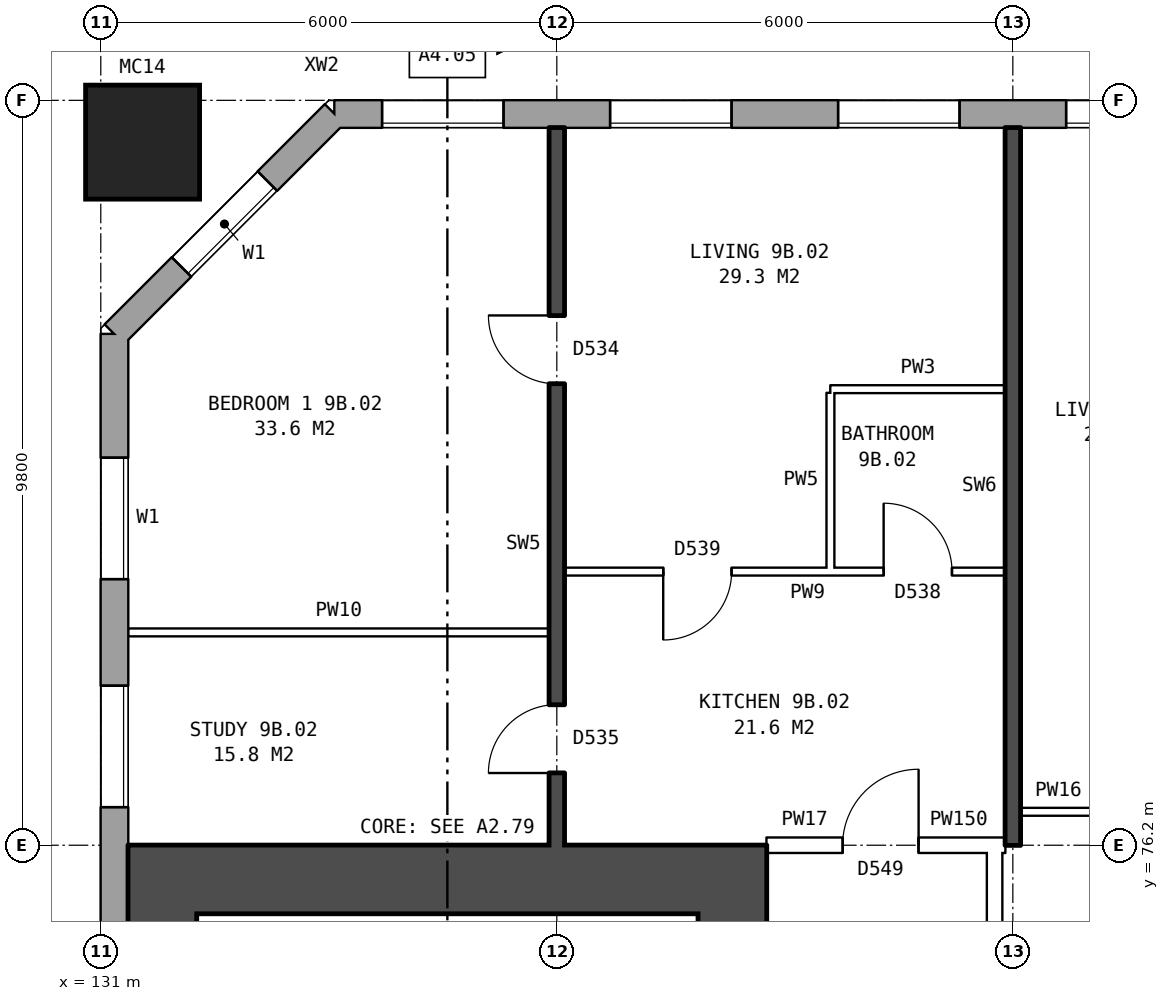
"""IFC4 building model, lengths in metres.
Left out: names, types, materials, properties, quantities, classifications, styles, units other than length and angle.
Written with IfcOpenShell. Run it as: python <this file> out.ifc"""

import sys

from ifc_helpers import new_model, si_unit, direction, frame, frame_2d, origin, origin_2d, place, context, subcontext, project, spatial, rectangle, hollow_rectangle, extrude, element, fill, save


model = new_model("IFC4")
c1 = context("Model", 3, precision=1e-05, world=origin(), true_north=direction((0.0, 1.0)))
c2 = subcontext(c1, "Body", "Model", "MODEL_VIEW")
j1 = project(units=[si_unit("LENGTHUNIT", "METRE"), si_unit("PLANEANGLEUNIT", "RADIAN")], contexts=[c1])
p1 = place(None, origin())
s1 = spatial("IfcSite", under=j1, at=p1, CompositionType="ELEMENT")
p2 = place(p1, origin())
s2 = spatial("IfcBuilding", under=s1, at=p2, CompositionType="ELEMENT")
p3 = place(p2, frame((0.0, 0.0, 35.0)))
s3 = spatial("IfcBuildingStorey", under=s2, at=p3, CompositionType="ELEMENT", Elevation=35.0)
p4 = place(p3, frame((131.55, 85.45, 0.0), z_axis=(0.0, 0.0, 1.0), x_axis=(1.0, 0.0, 0.0)))
e1 = element("IfcColumn", 1, at=p4, inside=s3, PredefinedType="COLUMN", context=c2, shape_type="SweptSolid", body=[
    extrude(hollow_rectangle(XDim=1.5, YDim=1.5, WallThickness=0.08, at=origin_2d()), origin(), (0.0, 0.0, 1.0), 3.1),
])
p5 = place(p3, frame((174.675, 85.82, 0.0), z_axis=(0.0, 0.0, 1.0), x_axis=(-1.0, 0.0, 0.0)))
e2 = element("IfcWall", 2, at=p5, inside=s3, PredefinedType="STANDARD", context=c2, shape_type="SweptSolid", body=[
    extrude(rectangle(XDim=40.601, YDim=0.36, at=frame_2d((20.3, 0.0))), origin(), (0.0, 0.0, 1.0), 2.85),
])
p6 = place(p5, frame((2.375, 0.0, 0.8)))
e3 = element("IfcOpeningElement", 3, at=p6, cuts=e2, PredefinedType="OPENING", context=c2, shape_type="SweptSolid", body=[
    extrude(rectangle(XDim=1.6, YDim=1.8, at=frame_2d((0.8, 0.9))), frame((0.0, 0.19, 0.0), z_axis=(0.0, -1.0, 0.0), x_axis=(1.0, 0.0, 0.0)), (0.0, 0.0, 1.0), 0.38),
])
p7 = place(p5, frame((5.375, 0.0, 0.8)))
e4 = element("IfcOpeningElement", 4, at=p7, cuts=e2, PredefinedType="OPENING", context=c2, shape_type="SweptSolid", body=[
    extrude(rectangle(XDim=1.6, YDim=1.8, at=frame_2d((0.8, 0.9))), frame((0.0, 0.19, 0.0), z_axis=(0.0, -1.0, 0.0), x_axis=(1.0, 0.0, 0.0)), (0.0, 0.0, 1.0), 0.38),
])
p8 = place(p5, frame((8.375, 0.0, 0.8)))
e5 = element("IfcOpeningElement", 5, at=p8, cuts=e2, PredefinedType="OPENING", context=c2, shape_type="SweptSolid", body=[
    extrude(rectangle(XDim=1.6, YDim=1.8, at=frame_2d((0.8, 0.9))), frame((0.0, 0.19, 0.0), z_axis=(0.0, -1.0, 0.0), x_axis=(1.0, 0.0, 0.0)), (0.0, 0.0, 1.0), 0.38),
])
p9 = place(p5, frame((11.375, 0.0, 0.8)))
e6 = element("IfcOpeningElement", 6, at=p9, cuts=e2, PredefinedType="OPENING", context=c2, shape_type="SweptSolid", body=[
    extrude(rectangle(XDim=1.6, YDim=1.8, at=frame_2d((0.8, 0.9))), frame((0.0, 0.19, 0.0), z_axis=(0.0, -1.0, 0.0), x_axis=(1.0, 0.0, 0.0)), (0.0, 0.0, 1.0), 0.38),
])
p10 = place(p5, frame((14.375, 0.0, 0.8)))
e7 = element("IfcOpeningElement", 7, at=p10, cuts=e2, PredefinedType="OPENING", context=c2, shape_type="SweptSolid", body=[
    extrude(rectangle(XDim=1.6, YDim=1.8, at=frame_2d((0.8, 0.9))), frame((0.0, 0.19, 0.0), z_axis=(0.0, -1.0, 0.0), x_axis=(1.0, 0.0, 0.0)), (0.0, 0.0, 1.0), 0.38),
])
p11 = place(p5, frame((16.275, 0.0, 0.8)))
e8 = element("IfcOpeningElement", 8, at=p11, cuts=e2, PredefinedType="OPENING", context=c2, shape_type="SweptSolid", body=[
    extrude(rectangle(XDim=1.0, YDim=1.8, at=frame_2d((0.5, 0.9))), frame((0.0, 0.19, 0.0), z_axis=(0.0, -1.0, 0.0), x_axis=(1.0, 0.0, 0.0)), (0.0, 0.0, 1.0), 0.38),
])
p12 = place(p5, frame((19.975, 0.0, 0.15)))
e9 = element("IfcOpeningElement", 9, at=p12, cuts=e2, PredefinedType="OPENING", context=c2, shape_type="SweptSolid", body=[
    extrude(rectangle(XDim=0.6, YDim=1.8, at=frame_2d((0.3, 0.9))), frame((0.0, 0.19, 0.0), z_axis=(0.0, -1.0, 0.0), x_axis=(1.0, 0.0, 0.0)), (0.0, 0.0, 1.0), 0.38),
])
p13 = place(p5, frame((23.375, 0.0, 0.8)))
e10 = element("IfcOpeningElement", 10, at=p13, cuts=e2, PredefinedType="OPENING", context=c2, shape_type="SweptSolid", body=[
    extrude(rectangle(XDim=1.6, YDim=1.8, at=frame_2d((0.8, 0.9))), frame((0.0, 0.19, 0.0), z_axis=(0.0, -1.0, 0.0), x_axis=(1.0, 0.0, 0.0)), (0.0, 0.0, 1.0), 0.38),
])
p14 = place(p5, frame((26.375, 0.0, 0.8)))
e11 = element("IfcOpeningElement", 11, at=p14, cuts=e2, PredefinedType="OPENING", context=c2, shape_type="SweptSolid", body=[
    extrude(rectangle(XDim=1.6, YDim=1.8, at=frame_2d((0.8, 0.9))), frame((0.0, 0.19, 0.0), z_axis=(0.0, -1.0, 0.0), x_axis=(1.0, 0.0, 0.0)), (0.0, 0.0, 1.0), 0.38),
])
p15 = place(p5, frame((29.375, 0.0, 0.8)))
e12 = element("IfcOpeningElement", 12, at=p15, cuts=e2, PredefinedType="OPENING", context=c2, shape_type="SweptSolid", body=[
    extrude(rectangle(XDim=1.6, YDim=1.8, at=frame_2d((0.8, 0.9))), frame((0.0, 0.19, 0.0), z_axis=(0.0, -1.0, 0.0), x_axis=(1.0, 0.0, 0.0)), (0.0, 0.0, 1.0), 0.38),
])
p16 = place(p5, frame((32.375, 0.0, 0.8)))
e13 = element("IfcOpeningElement", 13, at=p16, cuts=e2, PredefinedType="OPENING", context=c2, shape_type="SweptSolid", body=[
    extrude(rectangle(XDim=1.6, YDim=1.8, at=frame_2d((0.8, 0.9))), frame((0.0, 0.19, 0.0), z_axis=(0.0, -1.0, 0.0), x_axis=(1.0, 0.0, 0.0)), (0.0, 0.0, 1.0), 0.38),
])
p17 = place(p5, frame((35.375, 0.0, 0.8)))
e14 = element("IfcOpeningElement", 14, at=p17, cuts=e2, PredefinedType="OPENING", context=c2, shape_type="SweptSolid", body=[
    extrude(rectangle(XDim=1.6, YDim=1.8, at=frame_2d((0.8, 0.9))), frame((0.0, 0.19, 0.0), z_axis=(0.0, -1.0, 0.0), x_axis=(1.0, 0.0, 0.0)), (0.0, 0.0, 1.0), 0.38),
])
p18 = place(p5, frame((38.375, 0.0, 0.8)))
e15 = element("IfcOpeningElement", 15, at=p18, cuts=e2, PredefinedType="OPENING", context=c2, shape_type="SweptSolid", body=[
    extrude(rectangle(XDim=1.6, YDim=1.8, at=frame_2d((0.8, 0.9))), frame((0.0, 0.19, 0.0), z_axis=(0.0, -1.0, 0.0), x_axis=(1.0, 0.0, 0.0)), (0.0, 0.0, 1.0), 0.38),
])
p19 = place(p5, frame((17.575, 0.0, 1.7)))
e16 = element("IfcOpeningElement", 16, at=p19, cuts=e2, PredefinedType="OPENING", context=c2, shape_type="SweptSolid", body=[
    extrude(rectangle(XDim=0.8, YDim=0.9, at=frame_2d((0.4, 0.45))), frame((0.0, 0.19, 0.0), z_axis=(0.0, -1.0, 0.0), x_axis=(1.0, 0.0, 0.0)), (0.0, 0.0, 1.0), 0.38),
])
p20 = place(p5, frame((20.875, 0.0, 0.15)))
e17 = element("IfcOpeningElement", 17, at=p20, cuts=e2, PredefinedType="OPENING", context=c2, shape_type="SweptSolid", body=[
    extrude(rectangle(XDim=0.8, YDim=0.9, at=frame_2d((0.4, 0.45))), frame((0.0, 0.19, 0.0), z_axis=(0.0, -1.0, 0.0), x_axis=(1.0, 0.0, 0.0)), (0.0, 0.0, 1.0), 0.38),
])
p21 = place(p3, frame((134.075, 85.82, 0.0), z_axis=(0.0, 0.0, 1.0), x_axis=(-0.707106781187, -0.707106781187, 0.0)))
e18 = element("IfcWall", 18, at=p21, inside=s3, PredefinedType="STANDARD", context=c2, shape_type="SweptSolid", body=[
    extrude(rectangle(XDim=4.094, YDim=0.36, at=frame_2d((2.047, 0.0))), origin(), (0.0, 0.0, 1.0), 2.85),
])
p22 = place(p21, frame((1.247, 0.0, 0.8)))
e19 = element("IfcOpeningElement", 19, at=p22, cuts=e18, PredefinedType="OPENING", context=c2, shape_type="SweptSolid", body=[
    extrude(rectangle(XDim=1.6, YDim=1.8, at=frame_2d((0.8, 0.9))), frame((0.0, 0.19, 0.0), z_axis=(0.0, -1.0, 0.0), x_axis=(1.0, 0.0, 0.0)), (0.0, 0.0, 1.0), 0.38),
])
p23 = place(p3, frame((131.18, 82.925, 0.0), z_axis=(0.0, 0.0, 1.0), x_axis=(0.0, -1.0, 0.0)))
e20 = element("IfcWall", 20, at=p23, inside=s3, PredefinedType="STANDARD", context=c2, shape_type="SweptSolid", body=[
    extrude(rectangle(XDim=25.851, YDim=0.36, at=frame_2d((12.925, 0.0))), origin(), (0.0, 0.0, 1.0), 2.85),
])
p24 = place(p23, frame((1.625, 0.0, 0.8)))
e21 = element("IfcOpeningElement", 21, at=p24, cuts=e20, PredefinedType="OPENING", context=c2, shape_type="SweptSolid", body=[
    extrude(rectangle(XDim=1.6, YDim=1.8, at=frame_2d((0.8, 0.9))), frame((0.0, 0.19, 0.0), z_axis=(0.0, -1.0, 0.0), x_axis=(1.0, 0.0, 0.0)), (0.0, 0.0, 1.0), 0.38),
])
p25 = place(p23, frame((4.625, 0.0, 0.8)))
e22 = element("IfcOpeningElement", 22, at=p25, cuts=e20, PredefinedType="OPENING", context=c2, shape_type="SweptSolid", body=[
    extrude(rectangle(XDim=1.6, YDim=1.8, at=frame_2d((0.8, 0.9))), frame((0.0, 0.19, 0.0), z_axis=(0.0, -1.0, 0.0), x_axis=(1.0, 0.0, 0.0)), (0.0, 0.0, 1.0), 0.38),
])
p26 = place(p23, frame((19.625, 0.0, 0.8)))
e23 = element("IfcOpeningElement", 23, at=p26, cuts=e20, PredefinedType="OPENING", context=c2, shape_type="SweptSolid", body=[
    extrude(rectangle(XDim=1.6, YDim=1.8, at=frame_2d((0.8, 0.9))), frame((0.0, 0.19, 0.0), z_axis=(0.0, -1.0, 0.0), x_axis=(1.0, 0.0, 0.0)), (0.0, 0.0, 1.0), 0.38),
])
p27 = place(p23, frame((22.625, 0.0, 0.8)))
e24 = element("IfcOpeningElement", 24, at=p27, cuts=e20, PredefinedType="OPENING", context=c2, shape_type="SweptSolid", body=[
    extrude(rectangle(XDim=1.6, YDim=1.8, at=frame_2d((0.8, 0.9))), frame((0.0, 0.19, 0.0), z_axis=(0.0, -1.0, 0.0), x_axis=(1.0, 0.0, 0.0)), (0.0, 0.0, 1.0), 0.38),
])
p28 = place(p3, frame((139.31, 64.7, 0.0), z_axis=(0.0, 0.0, 1.0), x_axis=(0.0, 1.0, 0.0)))
e25 = element("IfcWall", 25, at=p28, inside=s3, PredefinedType="SHEAR", context=c2, shape_type="SweptSolid", body=[
    extrude(rectangle(XDim=10.6, YDim=0.9, at=frame_2d((5.3, 0.0))), origin(), (0.0, 0.0, 1.0), 2.85),
])
p29 = place(p28, frame((0.425, 0.0, 0.0)))
e26 = element("IfcOpeningElement", 26, at=p29, cuts=e25, PredefinedType="OPENING", context=c2, shape_type="SweptSolid", body=[
    extrude(rectangle(XDim=1.1, YDim=2.1, at=frame_2d((0.55, 1.05))), frame((0.0, 0.46, 0.0), z_axis=(0.0, -1.0, 0.0), x_axis=(1.0, 0.0, 0.0)), (0.0, 0.0, 1.0), 0.92),
])
p30 = place(p28, frame((9.0, 0.0, 0.0)))
e27 = element("IfcOpeningElement", 27, at=p30, cuts=e25, PredefinedType="OPENING", context=c2, shape_type="SweptSolid", body=[
    extrude(rectangle(XDim=1.1, YDim=2.1, at=frame_2d((0.55, 1.05))), frame((0.0, 0.46, 0.0), z_axis=(0.0, -1.0, 0.0), x_axis=(1.0, 0.0, 0.0)), (0.0, 0.0, 1.0), 0.92),
])
p31 = place(p28, frame((7.225, 0.0, 0.0)))
e28 = element("IfcOpeningElement", 28, at=p31, cuts=e25, PredefinedType="OPENING", context=c2, shape_type="SweptSolid", body=[
    extrude(rectangle(XDim=0.85, YDim=2.1, at=frame_2d((0.425, 1.05))), frame((0.0, 0.46, 0.0), z_axis=(0.0, -1.0, 0.0), x_axis=(1.0, 0.0, 0.0)), (0.0, 0.0, 1.0), 0.92),
])
p32 = place(p3, frame((131.81, 64.7, 0.0), z_axis=(0.0, 0.0, 1.0), x_axis=(0.0, 1.0, 0.0)))
e29 = element("IfcWall", 29, at=p32, inside=s3, PredefinedType="SHEAR", context=c2, shape_type="SweptSolid", body=[
    extrude(rectangle(XDim=10.6, YDim=0.9, at=frame_2d((5.3, 0.0))), origin(), (0.0, 0.0, 1.0), 2.85),
])
p33 = place(p3, frame((139.76, 75.75, 0.0), z_axis=(0.0, 0.0, 1.0), x_axis=(-1.0, 0.0, 0.0)))
e30 = element("IfcWall", 30, at=p33, inside=s3, PredefinedType="SHEAR", context=c2, shape_type="SweptSolid", body=[
    extrude(rectangle(XDim=8.4, YDim=0.9, at=frame_2d((4.2, 0.0))), origin(), (0.0, 0.0, 1.0), 2.85),
])
p34 = place(p3, frame((142.76, 63.9, 0.0), z_axis=(0.0, 0.0, 1.0), x_axis=(0.0, 1.0, 0.0)))
e31 = element("IfcWall", 31, at=p34, inside=s3, PredefinedType="PARTITIONING", context=c2, shape_type="SweptSolid", body=[
    extrude(rectangle(XDim=12.2, YDim=0.2, at=frame_2d((6.1, 0.0))), origin(), (0.0, 0.0, 1.0), 2.85),
])
p35 = place(p34, frame((5.1, 0.0, 0.0)))
e32 = element("IfcOpeningElement", 32, at=p35, cuts=e31, PredefinedType="OPENING", context=c2, shape_type="SweptSolid", body=[
    extrude(rectangle(XDim=2.0, YDim=2.1, at=frame_2d((1.0, 1.05))), frame((0.0, 0.11, 0.0), z_axis=(0.0, -1.0, 0.0), x_axis=(1.0, 0.0, 0.0)), (0.0, 0.0, 1.0), 0.22),
])
p36 = place(p3, frame((139.76, 76.2, 0.0), z_axis=(0.0, 0.0, 1.0), x_axis=(1.0, 0.0, 0.0)))
e33 = element("IfcWall", 33, at=p36, inside=s3, PredefinedType="PARTITIONING", context=c2, shape_type="SweptSolid", body=[
    extrude(rectangle(XDim=3.0, YDim=0.2, at=frame_2d((1.5, 0.0))), origin(), (0.0, 0.0, 1.0), 2.85),
])
p37 = place(p36, frame((1.0, 0.0, 0.0)))
e34 = element("IfcOpeningElement", 34, at=p37, cuts=e33, PredefinedType="OPENING", context=c2, shape_type="SweptSolid", body=[
    extrude(rectangle(XDim=1.0, YDim=2.1, at=frame_2d((0.5, 1.05))), frame((0.0, 0.11, 0.0), z_axis=(0.0, -1.0, 0.0), x_axis=(1.0, 0.0, 0.0)), (0.0, 0.0, 1.0), 0.22),
])
p38 = place(p3, frame((142.76, 76.2, 0.0), z_axis=(0.0, 0.0, 1.0), x_axis=(1.0, 0.0, 0.0)))
e35 = element("IfcWall", 35, at=p38, inside=s3, PredefinedType="PARTITIONING", context=c2, shape_type="SweptSolid", body=[
    extrude(rectangle(XDim=0.14, YDim=0.2, at=frame_2d((0.07, 0.0))), origin(), (0.0, 0.0, 1.0), 2.85),
])
p39 = place(p3, frame((143.1, 76.64, 0.0), z_axis=(0.0, 0.0, 1.0), x_axis=(1.0, 0.0, 0.0)))
e36 = element("IfcWall", 36, at=p39, inside=s3, PredefinedType="PARTITIONING", context=c2, shape_type="SweptSolid", body=[
    extrude(rectangle(XDim=2.9, YDim=0.1, at=frame_2d((1.45, 0.0))), origin(), (0.0, 0.0, 1.0), 2.85),
])
p40 = place(p39, frame((1.0, 0.0, 0.0)))
e37 = element("IfcOpeningElement", 37, at=p40, cuts=e36, PredefinedType="OPENING", context=c2, shape_type="SweptSolid", body=[
    extrude(rectangle(XDim=0.9, YDim=2.1, at=frame_2d((0.45, 1.05))), frame((0.0, 0.06, 0.0), z_axis=(0.0, -1.0, 0.0), x_axis=(1.0, 0.0, 0.0)), (0.0, 0.0, 1.0), 0.12),
])
p41 = place(p3, frame((131.36, 79.0, 0.0), z_axis=(0.0, 0.0, 1.0), x_axis=(1.0, 0.0, 0.0)))
e38 = element("IfcWall", 38, at=p41, inside=s3, PredefinedType="PARTITIONING", context=c2, shape_type="SweptSolid", body=[
    extrude(rectangle(XDim=5.54, YDim=0.1, at=frame_2d((2.77, 0.0))), origin(), (0.0, 0.0, 1.0), 2.85),
])
p42 = place(p3, frame((137.1, 79.8, 0.0), z_axis=(0.0, 0.0, 1.0), x_axis=(1.0, 0.0, 0.0)))
e39 = element("IfcWall", 39, at=p42, inside=s3, PredefinedType="PARTITIONING", context=c2, shape_type="SweptSolid", body=[
    extrude(rectangle(XDim=5.8, YDim=0.1, at=frame_2d((2.9, 0.0))), origin(), (0.0, 0.0, 1.0), 2.85),
])
p43 = place(p42, frame((1.3, 0.0, 0.0)))
e40 = element("IfcOpeningElement", 40, at=p43, cuts=e39, PredefinedType="OPENING", context=c2, shape_type="SweptSolid", body=[
    extrude(rectangle(XDim=0.9, YDim=2.1, at=frame_2d((0.45, 1.05))), frame((0.0, 0.06, 0.0), z_axis=(0.0, -1.0, 0.0), x_axis=(1.0, 0.0, 0.0)), (0.0, 0.0, 1.0), 0.12),
])
p44 = place(p42, frame((4.2, 0.0, 0.0)))
e41 = element("IfcOpeningElement", 41, at=p44, cuts=e39, PredefinedType="OPENING", context=c2, shape_type="SweptSolid", body=[
    extrude(rectangle(XDim=0.9, YDim=2.1, at=frame_2d((0.45, 1.05))), frame((0.0, 0.06, 0.0), z_axis=(0.0, -1.0, 0.0), x_axis=(1.0, 0.0, 0.0)), (0.0, 0.0, 1.0), 0.12),
])
p45 = place(p3, frame((140.6, 82.2, 0.0), z_axis=(0.0, 0.0, 1.0), x_axis=(1.0, 0.0, 0.0)))
e42 = element("IfcWall", 42, at=p45, inside=s3, PredefinedType="PARTITIONING", context=c2, shape_type="SweptSolid", body=[
    extrude(rectangle(XDim=2.3, YDim=0.1, at=frame_2d((1.15, 0.0))), origin(), (0.0, 0.0, 1.0), 2.85),
])
p46 = place(p3, frame((137.0, 76.2, 0.0), z_axis=(0.0, 0.0, 1.0), x_axis=(0.0, 1.0, 0.0)))
e43 = element("IfcWall", 43, at=p46, inside=s3, PredefinedType="SOLIDWALL", context=c2, shape_type="SweptSolid", body=[
    extrude(rectangle(XDim=9.44, YDim=0.2, at=frame_2d((4.72, 0.0))), origin(), (0.0, 0.0, 1.0), 2.85),
])
p47 = place(p46, frame((6.07, 0.0, 0.0)))
e44 = element("IfcOpeningElement", 44, at=p47, cuts=e43, PredefinedType="OPENING", context=c2, shape_type="SweptSolid", body=[
    extrude(rectangle(XDim=0.9, YDim=2.1, at=frame_2d((0.45, 1.05))), frame((0.0, 0.11, 0.0), z_axis=(0.0, -1.0, 0.0), x_axis=(1.0, 0.0, 0.0)), (0.0, 0.0, 1.0), 0.22),
])
p48 = place(p46, frame((0.95, 0.0, 0.0)))
e45 = element("IfcOpeningElement", 45, at=p48, cuts=e43, PredefinedType="OPENING", context=c2, shape_type="SweptSolid", body=[
    extrude(rectangle(XDim=0.9, YDim=2.1, at=frame_2d((0.45, 1.05))), frame((0.0, 0.11, 0.0), z_axis=(0.0, -1.0, 0.0), x_axis=(1.0, 0.0, 0.0)), (0.0, 0.0, 1.0), 0.22),
])
p49 = place(p3, frame((140.6, 79.85, 0.0), z_axis=(0.0, 0.0, 1.0), x_axis=(0.0, 1.0, 0.0)))
e46 = element("IfcWall", 46, at=p49, inside=s3, PredefinedType="PARTITIONING", context=c2, shape_type="SweptSolid", body=[
    extrude(rectangle(XDim=2.3, YDim=0.1, at=frame_2d((1.15, 0.0))), origin(), (0.0, 0.0, 1.0), 2.85),
])
p50 = place(p3, frame((143.0, 76.2, 0.0), z_axis=(0.0, 0.0, 1.0), x_axis=(0.0, 1.0, 0.0)))
e47 = element("IfcWall", 47, at=p50, inside=s3, PredefinedType="SOLIDWALL", context=c2, shape_type="SweptSolid", body=[
    extrude(rectangle(XDim=9.44, YDim=0.2, at=frame_2d((4.72, 0.0))), origin(), (0.0, 0.0, 1.0), 2.85),
])
p51 = place(p15, origin())
e48 = element("IfcWindow", 48, at=p51, inside=s3, PartitioningType="SINGLE_PANEL", PredefinedType="WINDOW", context=c2, shape_type="SweptSolid", body=[
    extrude(rectangle(XDim=1.6, YDim=1.8, at=frame_2d((0.8, 0.9))), frame((0.0, 0.15, 0.0), z_axis=(0.0, -1.0, 0.0), x_axis=(1.0, 0.0, 0.0)), (0.0, 0.0, 1.0), 0.06),
])
fill(e12, e48)
p52 = place(p16, origin())
e49 = element("IfcWindow", 49, at=p52, inside=s3, PartitioningType="SINGLE_PANEL", PredefinedType="WINDOW", context=c2, shape_type="SweptSolid", body=[
    extrude(rectangle(XDim=1.6, YDim=1.8, at=frame_2d((0.8, 0.9))), frame((0.0, 0.15, 0.0), z_axis=(0.0, -1.0, 0.0), x_axis=(1.0, 0.0, 0.0)), (0.0, 0.0, 1.0), 0.06),
])
fill(e13, e49)
p53 = place(p17, origin())
e50 = element("IfcWindow", 50, at=p53, inside=s3, PartitioningType="SINGLE_PANEL", PredefinedType="WINDOW", context=c2, shape_type="SweptSolid", body=[
    extrude(rectangle(XDim=1.6, YDim=1.8, at=frame_2d((0.8, 0.9))), frame((0.0, 0.15, 0.0), z_axis=(0.0, -1.0, 0.0), x_axis=(1.0, 0.0, 0.0)), (0.0, 0.0, 1.0), 0.06),
])
fill(e14, e50)
p54 = place(p18, origin())
e51 = element("IfcWindow", 51, at=p54, inside=s3, PartitioningType="SINGLE_PANEL", PredefinedType="WINDOW", context=c2, shape_type="SweptSolid", body=[
    extrude(rectangle(XDim=1.6, YDim=1.8, at=frame_2d((0.8, 0.9))), frame((0.0, 0.15, 0.0), z_axis=(0.0, -1.0, 0.0), x_axis=(1.0, 0.0, 0.0)), (0.0, 0.0, 1.0), 0.06),
])
fill(e15, e51)
p55 = place(p22, origin())
e52 = element("IfcWindow", 52, at=p55, inside=s3, PartitioningType="SINGLE_PANEL", PredefinedType="WINDOW", context=c2, shape_type="SweptSolid", body=[
    extrude(rectangle(XDim=1.6, YDim=1.8, at=frame_2d((0.8, 0.9))), frame((0.0, 0.15, 0.0), z_axis=(0.0, -1.0, 0.0), x_axis=(1.0, 0.0, 0.0)), (0.0, 0.0, 1.0), 0.06),
])
fill(e19, e52)
p56 = place(p24, origin())
e53 = element("IfcWindow", 53, at=p56, inside=s3, PartitioningType="SINGLE_PANEL", PredefinedType="WINDOW", context=c2, shape_type="SweptSolid", body=[
    extrude(rectangle(XDim=1.6, YDim=1.8, at=frame_2d((0.8, 0.9))), frame((0.0, 0.15, 0.0), z_axis=(0.0, -1.0, 0.0), x_axis=(1.0, 0.0, 0.0)), (0.0, 0.0, 1.0), 0.06),
])
fill(e21, e53)
p57 = place(p25, origin())
e54 = element("IfcWindow", 54, at=p57, inside=s3, PartitioningType="SINGLE_PANEL", PredefinedType="WINDOW", context=c2, shape_type="SweptSolid", body=[
    extrude(rectangle(XDim=1.6, YDim=1.8, at=frame_2d((0.8, 0.9))), frame((0.0, 0.15, 0.0), z_axis=(0.0, -1.0, 0.0), x_axis=(1.0, 0.0, 0.0)), (0.0, 0.0, 1.0), 0.06),
])
fill(e22, e54)
p58 = place(p47, origin())
e55 = element("IfcDoor", 55, at=p58, inside=s3, OperationType="SINGLE_SWING_RIGHT", PredefinedType="DOOR", context=c2, shape_type="SweptSolid", body=[
    extrude(rectangle(XDim=0.9, YDim=2.1, at=frame_2d((0.45, 1.05))), frame((0.0, 0.025, 0.0), z_axis=(0.0, -1.0, 0.0), x_axis=(1.0, 0.0, 0.0)), (0.0, 0.0, 1.0), 0.05),
])
fill(e44, e55)
p59 = place(p48, origin())
e56 = element("IfcDoor", 56, at=p59, inside=s3, OperationType="SINGLE_SWING_LEFT", PredefinedType="DOOR", context=c2, shape_type="SweptSolid", body=[
    extrude(rectangle(XDim=0.9, YDim=2.1, at=frame_2d((0.45, 1.05))), frame((0.0, 0.025, 0.0), z_axis=(0.0, -1.0, 0.0), x_axis=(1.0, 0.0, 0.0)), (0.0, 0.0, 1.0), 0.05),
])
fill(e45, e56)
p60 = place(p37, origin())
e57 = element("IfcDoor", 57, at=p60, inside=s3, OperationType="SINGLE_SWING_RIGHT", PredefinedType="DOOR", context=c2, shape_type="SweptSolid", body=[
    extrude(rectangle(XDim=1.0, YDim=2.1, at=frame_2d((0.5, 1.05))), frame((0.0, 0.025, 0.0), z_axis=(0.0, -1.0, 0.0), x_axis=(1.0, 0.0, 0.0)), (0.0, 0.0, 1.0), 0.05),
])
fill(e34, e57)
p61 = place(p43, frame((0.9, 0.0, 0.0), z_axis=(0.0, 0.0, 1.0), x_axis=(-1.0, 0.0, 0.0)))
e58 = element("IfcDoor", 58, at=p61, inside=s3, OperationType="SINGLE_SWING_RIGHT", PredefinedType="DOOR", context=c2, shape_type="SweptSolid", body=[
    extrude(rectangle(XDim=0.9, YDim=2.1, at=frame_2d((0.45, 1.05))), frame((0.0, 0.025, 0.0), z_axis=(0.0, -1.0, 0.0), x_axis=(1.0, 0.0, 0.0)), (0.0, 0.0, 1.0), 0.05),
])
fill(e40, e58)
p62 = place(p44, origin())
e59 = element("IfcDoor", 59, at=p62, inside=s3, OperationType="SINGLE_SWING_LEFT", PredefinedType="DOOR", context=c2, shape_type="SweptSolid", body=[
    extrude(rectangle(XDim=0.9, YDim=2.1, at=frame_2d((0.45, 1.05))), frame((0.0, 0.025, 0.0), z_axis=(0.0, -1.0, 0.0), x_axis=(1.0, 0.0, 0.0)), (0.0, 0.0, 1.0), 0.05),
])
fill(e41, e59)
save(model, sys.argv[1])
